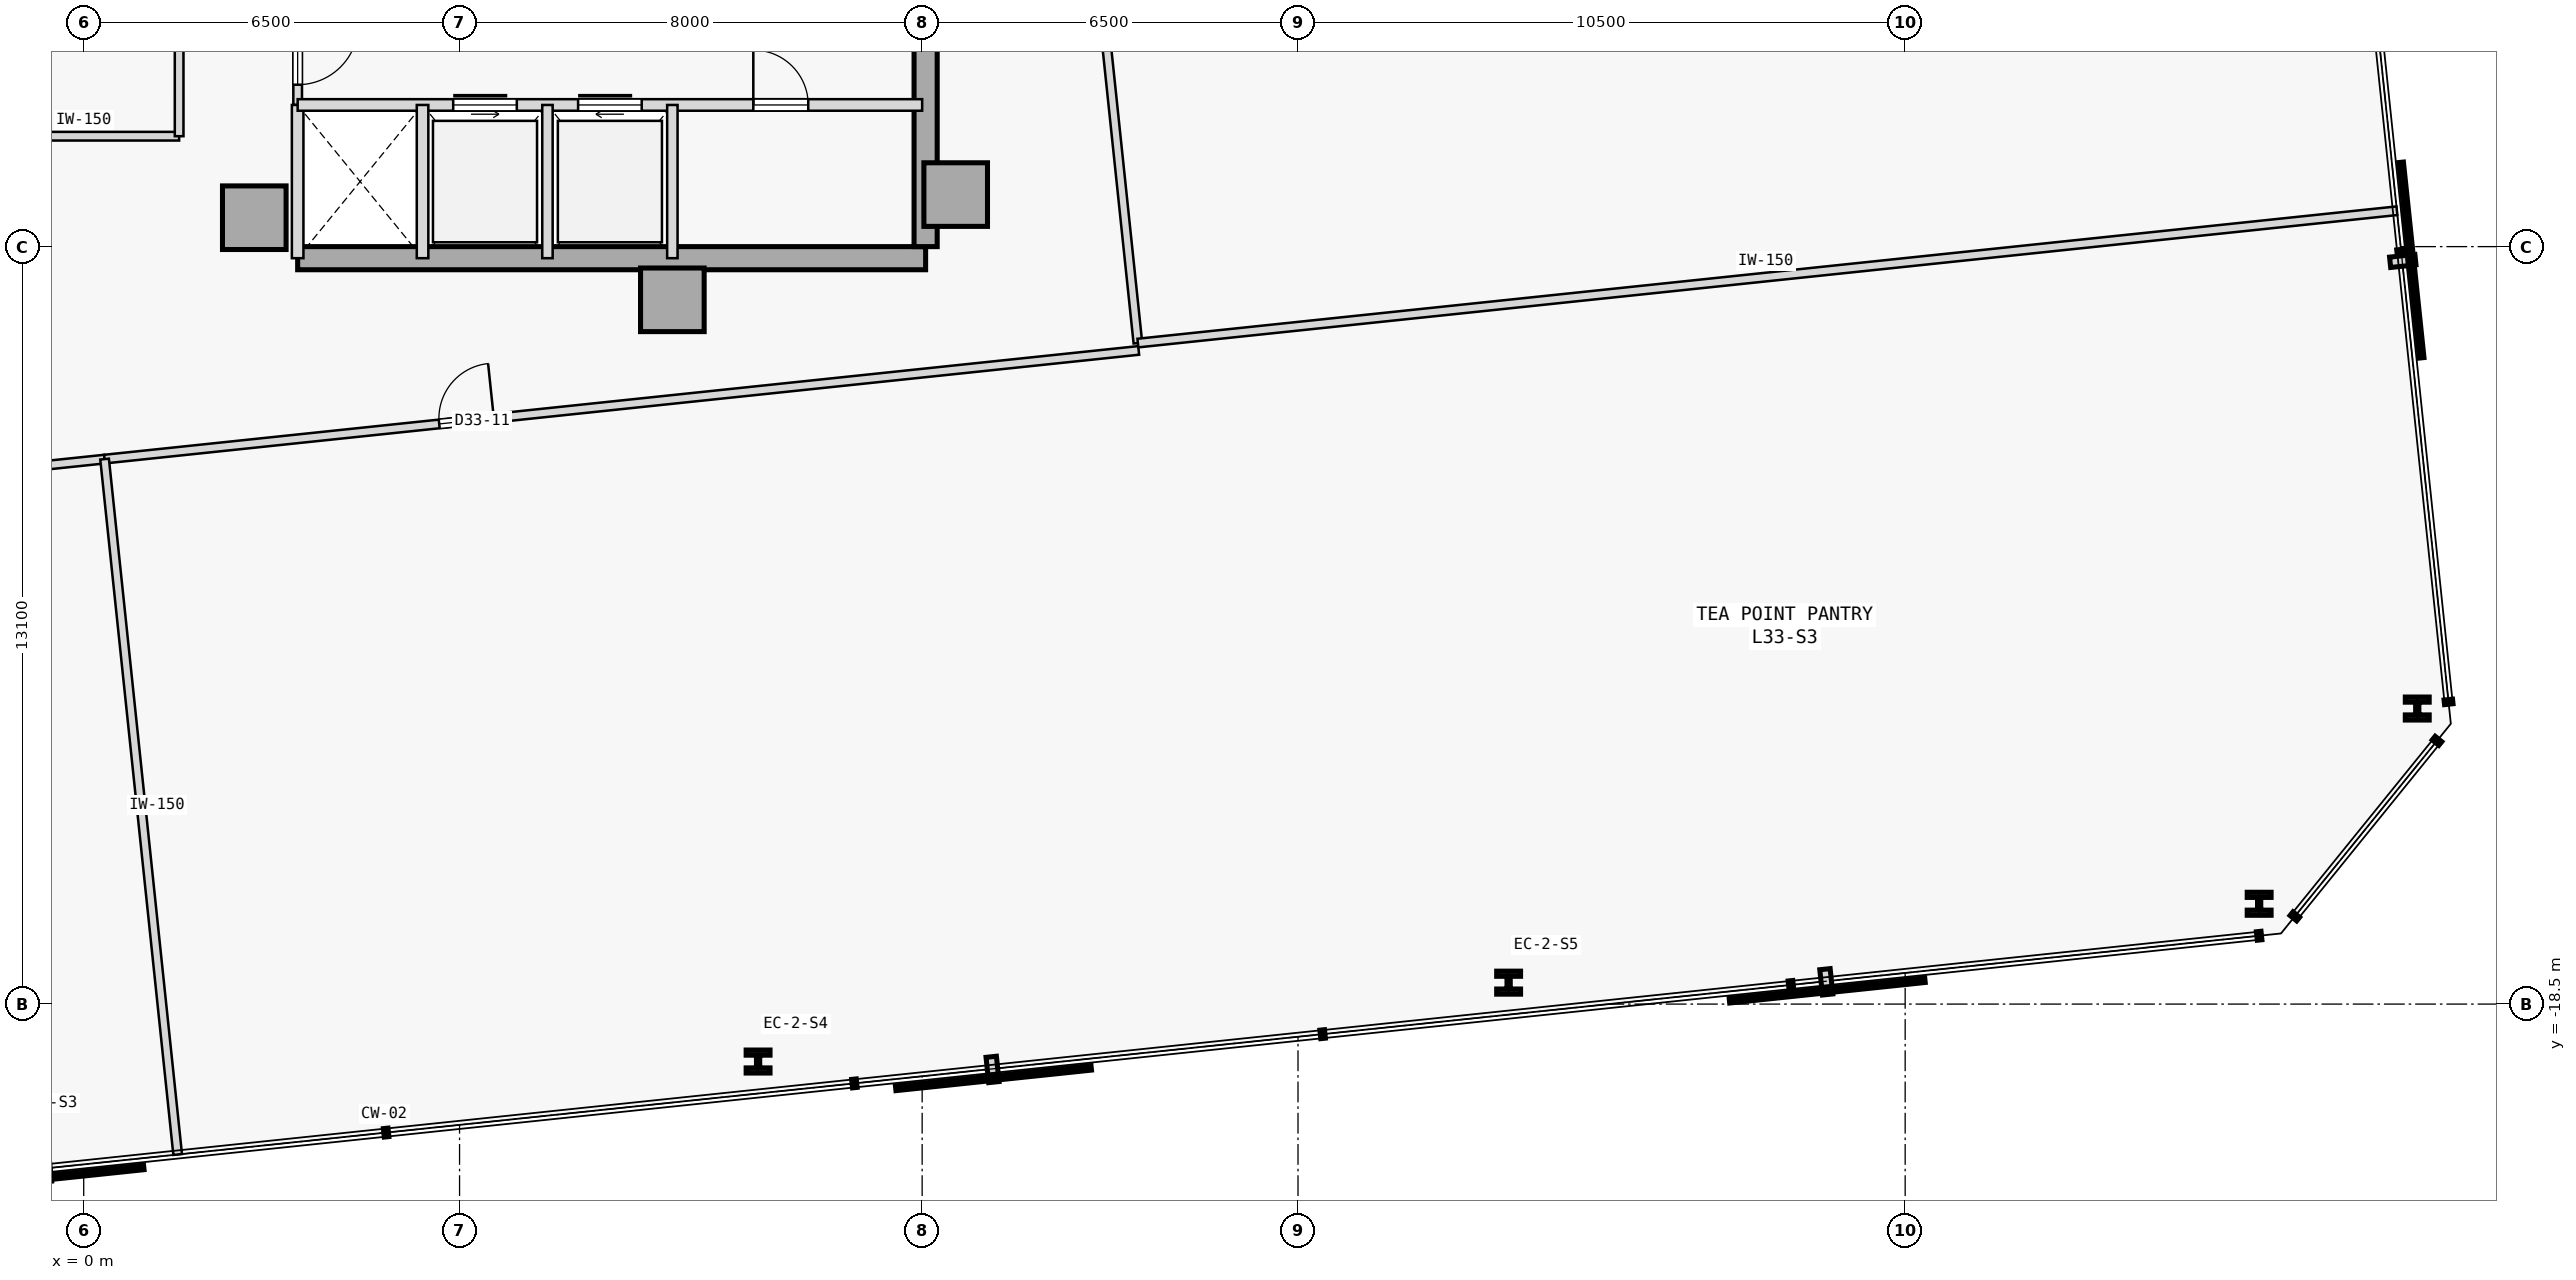
"""IFC4 building model, lengths in metres.
Left out: names, types, materials, properties, quantities, classifications, styles, units other than length and angle.
Written with IfcOpenShell. Run it as: python <this file> out.ifc"""

import sys

from ifc_helpers import new_model, si_unit, direction, frame, frame_2d, origin, origin_2d, place, context, subcontext, project, spatial, rectangle, i_section, extrude, element, fill, save


model = new_model("IFC4")
c1 = context("Model", 3, precision=1e-05, world=origin(), true_north=direction((0.0, 1.0)))
c2 = subcontext(c1, "Body", "Model", "MODEL_VIEW")
j1 = project(units=[si_unit("LENGTHUNIT", "METRE"), si_unit("PLANEANGLEUNIT", "RADIAN")], contexts=[c1])
p1 = place(None, origin())
s1 = spatial("IfcSite", under=j1, at=p1, CompositionType="ELEMENT")
p2 = place(p1, origin())
s2 = spatial("IfcBuilding", under=s1, at=p2, CompositionType="ELEMENT")
p3 = place(p2, frame((0.0, 0.0, 131.8)))
s3 = spatial("IfcBuildingStorey", under=s2, at=p3, CompositionType="ELEMENT", Elevation=131.8)
for number, where, z_axis, x_axis in (
    (1, (15.08, -4.5, 0.0), (0.0, 0.0, 1.0), (1.0, 0.0, 0.0)),
    (2, (10.18, -6.32, 0.0), (0.0, 0.0, 1.0), (1.0, 0.0, 0.0)),
    (3, (2.95, -4.9, 0.0), (0.0, 0.0, 1.0), (1.0, 0.0, 0.0)),
):
    element("IfcColumn", number, at=place(p3, frame(where, z_axis=z_axis, x_axis=x_axis)), inside=s3, PredefinedType="COLUMN", context=c2, shape_type="SweptSolid", body=[
        extrude(rectangle(XDim=1.1, YDim=1.1, at=origin_2d()), origin(), (0.0, 0.0, 1.0), 3.7),
    ])
p4 = place(p3, frame((3.7, -5.6, 0.0), z_axis=(0.0, 0.0, 1.0), x_axis=(1.0, 0.0, 0.0)))
e4 = element("IfcWall", 4, at=p4, inside=s3, PredefinedType="SHEAR", context=c2, shape_type="SweptSolid", body=[
    extrude(rectangle(XDim=10.86, YDim=0.4, at=frame_2d((5.43, 0.0))), origin(), (0.0, 0.0, 1.0), 3.475),
])
p5 = place(p3, frame((14.56, -5.4, 0.0), z_axis=(0.0, 0.0, 1.0), x_axis=(0.0, 1.0, 0.0)))
e5 = element("IfcWall", 5, at=p5, inside=s3, PredefinedType="SHEAR", context=c2, shape_type="SweptSolid", body=[
    extrude(rectangle(XDim=10.8, YDim=0.4, at=frame_2d((5.4, 0.0))), origin(), (0.0, 0.0, 1.0), 3.475),
])
for number, where, z_axis, x_axis in (
    (6, (11.663, -19.494, 0.0), (0.0, 0.0, 1.0), (1.0, 0.0, 0.0)),
    (7, (24.642, -18.129, 0.0), (0.0, 0.0, 1.0), (1.0, 0.0, 0.0)),
    (8, (37.622, -16.765, 0.0), (0.0, 0.0, 1.0), (1.0, 0.0, 0.0)),
    (9, (40.356, -13.389, 0.0), (0.0, 0.0, 1.0), (1.0, 0.0, 0.0)),
):
    element("IfcColumn", number, at=place(p3, frame(where, z_axis=z_axis, x_axis=x_axis)), inside=s3, PredefinedType="COLUMN", context=c2, shape_type="SweptSolid", body=[
        extrude(i_section(OverallWidth=0.413, OverallDepth=0.398, WebThickness=0.056, FlangeThickness=0.089, FilletRadius=0.015, at=origin_2d()), origin(), (0.0, 0.0, 1.0), 3.7),
    ])
p6 = place(p3, frame((3.7, -2.95, 0.0), z_axis=(0.0, 0.0, 1.0), x_axis=(0.0, 1.0, 0.0)))
e10 = element("IfcWall", 10, at=p6, inside=s3, PredefinedType="PARTITIONING", context=c2, shape_type="SweptSolid", body=[
    extrude(rectangle(XDim=1.8, YDim=0.15, at=frame_2d((0.9, 0.0))), origin(), (0.0, 0.0, 1.0), 3.475),
])
p7 = place(p6, frame((0.35, 0.0, 0.0)))
e11 = element("IfcOpeningElement", 11, at=p7, cuts=e10, PredefinedType="OPENING", context=c2, shape_type="SweptSolid", body=[
    extrude(rectangle(XDim=1.05, YDim=2.18, at=frame_2d((0.525, 1.09))), frame((0.0, 0.085, 0.0), z_axis=(0.0, -1.0, 0.0), x_axis=(1.0, 0.0, 0.0)), (0.0, 0.0, 1.0), 0.17),
])
p8 = place(p3, frame((3.7, -5.6, 0.0), z_axis=(0.0, 0.0, 1.0), x_axis=(0.0, 1.0, 0.0)))
e12 = element("IfcWall", 12, at=p8, inside=s3, PredefinedType="STANDARD", context=c2, shape_type="SweptSolid", body=[
    extrude(rectangle(XDim=2.65, YDim=0.2, at=frame_2d((1.325, 0.0))), origin(), (0.0, 0.0, 1.0), 3.475),
])
p9 = place(p3, frame((3.7, -2.95, 0.0), z_axis=(0.0, 0.0, 1.0), x_axis=(1.0, 0.0, 0.0)))
e13 = element("IfcWall", 13, at=p9, inside=s3, PredefinedType="STANDARD", context=c2, shape_type="SweptSolid", body=[
    extrude(rectangle(XDim=10.8, YDim=0.2, at=frame_2d((5.4, 0.0))), origin(), (0.0, 0.0, 1.0), 3.475),
])
p10 = place(p9, frame((2.69, 0.0, 0.0)))
e14 = element("IfcOpeningElement", 14, at=p10, cuts=e13, PredefinedType="OPENING", context=c2, shape_type="SweptSolid", body=[
    extrude(rectangle(XDim=1.1, YDim=2.15, at=frame_2d((0.55, 1.075))), frame((0.0, 0.11, 0.0), z_axis=(0.0, -1.0, 0.0), x_axis=(1.0, 0.0, 0.0)), (0.0, 0.0, 1.0), 0.22),
])
p11 = place(p9, frame((4.85, 0.0, 0.0)))
e15 = element("IfcOpeningElement", 15, at=p11, cuts=e13, PredefinedType="OPENING", context=c2, shape_type="SweptSolid", body=[
    extrude(rectangle(XDim=1.1, YDim=2.15, at=frame_2d((0.55, 1.075))), frame((0.0, 0.11, 0.0), z_axis=(0.0, -1.0, 0.0), x_axis=(1.0, 0.0, 0.0)), (0.0, 0.0, 1.0), 0.22),
])
p12 = place(p9, frame((7.88, 0.0, 0.0)))
e16 = element("IfcOpeningElement", 16, at=p12, cuts=e13, PredefinedType="OPENING", context=c2, shape_type="SweptSolid", body=[
    extrude(rectangle(XDim=0.95, YDim=2.15, at=frame_2d((0.475, 1.075))), frame((0.0, 0.11, 0.0), z_axis=(0.0, -1.0, 0.0), x_axis=(1.0, 0.0, 0.0)), (0.0, 0.0, 1.0), 0.22),
])
p13 = place(p3, frame((5.86, -5.6, 0.0), z_axis=(0.0, 0.0, 1.0), x_axis=(0.0, 1.0, 0.0)))
e17 = element("IfcWall", 17, at=p13, inside=s3, PredefinedType="STANDARD", context=c2, shape_type="SweptSolid", body=[
    extrude(rectangle(XDim=2.65, YDim=0.2, at=frame_2d((1.325, 0.0))), origin(), (0.0, 0.0, 1.0), 3.475),
])
for number, where, z_axis, x_axis in (
    (18, (10.18, -5.6, 0.0), (0.0, 0.0, 1.0), (0.0, 1.0, 0.0)),
    (19, (8.02, -5.6, 0.0), (0.0, 0.0, 1.0), (0.0, 1.0, 0.0)),
):
    element("IfcWall", number, at=place(p3, frame(where, z_axis=z_axis, x_axis=x_axis)), inside=s3, PredefinedType="STANDARD", context=c2, shape_type="SweptSolid", body=[
        extrude(rectangle(XDim=2.65, YDim=0.18, at=frame_2d((1.325, 0.0))), origin(), (0.0, 0.0, 1.0), 3.475),
    ])
p14 = place(p3, frame((-1.65, -3.49, 0.0), z_axis=(0.0, 0.0, 1.0), x_axis=(1.0, 0.0, 0.0)))
e20 = element("IfcWall", 20, at=p14, inside=s3, PredefinedType="PARTITIONING", context=c2, shape_type="SweptSolid", body=[
    extrude(rectangle(XDim=3.3, YDim=0.15, at=frame_2d((1.65, 0.0))), origin(), (0.0, 0.0, 1.0), 3.475),
])
p15 = place(p3, frame((1.65, -3.49, 0.0), z_axis=(0.0, 0.0, 1.0), x_axis=(-6.9952083e-05, 0.999999997553, 0.0)))
e21 = element("IfcWall", 21, at=p15, inside=s3, PredefinedType="PARTITIONING", context=c2, shape_type="SweptSolid", body=[
    extrude(rectangle(XDim=6.98, YDim=0.15, at=frame_2d((3.49, 0.0))), origin(), (0.0, 0.0, 1.0), 3.475),
])
p16 = place(p3, frame((-16.14, -10.809, 0.0), z_axis=(0.0, 0.0, 1.0), x_axis=(0.994521566569, 0.104531591539, 0.0)))
e22 = element("IfcWall", 22, at=p16, inside=s3, PredefinedType="PARTITIONING", context=c2, shape_type="SweptSolid", body=[
    extrude(rectangle(XDim=16.592, YDim=0.15, at=frame_2d((8.296, 0.0))), origin(), (0.0, 0.0, 1.0), 3.475),
])
p17 = place(p16, frame((7.821, 0.0, 0.0)))
e23 = element("IfcOpeningElement", 23, at=p17, cuts=e22, PredefinedType="OPENING", context=c2, shape_type="SweptSolid", body=[
    extrude(rectangle(XDim=0.95, YDim=2.15, at=frame_2d((0.475, 1.075))), frame((0.0, 0.085, 0.0), z_axis=(0.0, -1.0, 0.0), x_axis=(1.0, 0.0, 0.0)), (0.0, 0.0, 1.0), 0.17),
])
p18 = place(p3, frame((0.361, -9.075, 0.0), z_axis=(0.0, 0.0, 1.0), x_axis=(0.994523293042, 0.104515164432, 0.0)))
e24 = element("IfcWall", 24, at=p18, inside=s3, PredefinedType="PARTITIONING", context=c2, shape_type="SweptSolid", body=[
    extrude(rectangle(XDim=17.982, YDim=0.15, at=frame_2d((8.991, 0.0))), origin(), (0.0, 0.0, 1.0), 3.475),
])
p19 = place(p18, frame((5.819, 0.0, 0.0)))
e25 = element("IfcOpeningElement", 25, at=p19, cuts=e24, PredefinedType="OPENING", context=c2, shape_type="SweptSolid", body=[
    extrude(rectangle(XDim=0.95, YDim=2.15, at=frame_2d((0.475, 1.075))), frame((0.0, 0.085, 0.0), z_axis=(0.0, -1.0, 0.0), x_axis=(1.0, 0.0, 0.0)), (0.0, 0.0, 1.0), 0.17),
])
p20 = place(p3, frame((18.231, -7.068, 0.0), z_axis=(0.0, 0.0, 1.0), x_axis=(-0.104529034836, 0.994521835294, 0.0)))
e26 = element("IfcWall", 26, at=p20, inside=s3, PredefinedType="PARTITIONING", context=c2, shape_type="SweptSolid", body=[
    extrude(rectangle(XDim=17.87, YDim=0.15, at=frame_2d((8.935, 0.0))), origin(), (0.0, 0.0, 1.0), 3.475),
])
p21 = place(p20, frame((8.46, 0.0, 0.0)))
e27 = element("IfcOpeningElement", 27, at=p21, cuts=e26, PredefinedType="OPENING", context=c2, shape_type="SweptSolid", body=[
    extrude(rectangle(XDim=0.95, YDim=2.15, at=frame_2d((0.475, 1.075))), frame((0.0, 0.085, 0.0), z_axis=(0.0, -1.0, 0.0), x_axis=(1.0, 0.0, 0.0)), (0.0, 0.0, 1.0), 0.17),
])
p22 = place(p3, frame((1.625, -21.102, 0.0), z_axis=(0.0, 0.0, 1.0), x_axis=(-0.104515587229, 0.99452324861, 0.0)))
e28 = element("IfcWall", 28, at=p22, inside=s3, PredefinedType="PARTITIONING", context=c2, shape_type="SweptSolid", body=[
    extrude(rectangle(XDim=12.093, YDim=0.15, at=frame_2d((6.046, 0.0))), origin(), (0.0, 0.0, 1.0), 3.475),
])
p23 = place(p3, frame((18.231, -7.068, 0.0), z_axis=(0.0, 0.0, 1.0), x_axis=(0.994521328491, 0.104533856601, 0.0)))
e29 = element("IfcWall", 29, at=p23, inside=s3, PredefinedType="PARTITIONING", context=c2, shape_type="SweptSolid", body=[
    extrude(rectangle(XDim=21.893, YDim=0.15, at=frame_2d((10.947, 0.0))), origin(), (0.0, 0.0, 1.0), 3.475),
])
p24 = place(p7, frame((1.05, 0.0, 0.0), z_axis=(0.0, 0.0, 1.0), x_axis=(-1.0, 0.0, 0.0)))
e30 = element("IfcDoor", 30, at=p24, inside=s3, OperationType="SINGLE_SWING_RIGHT", PredefinedType="DOOR", context=c2, shape_type="SweptSolid", body=[
    extrude(rectangle(XDim=1.05, YDim=2.18, at=frame_2d((0.525, 1.09))), frame((0.0, 0.025, 0.0), z_axis=(0.0, -1.0, 0.0), x_axis=(1.0, 0.0, 0.0)), (0.0, 0.0, 1.0), 0.05),
])
fill(e11, e30)
p25 = place(p10, origin())
e31 = element("IfcDoor", 31, at=p25, inside=s3, OperationType="SLIDING_TO_LEFT", PredefinedType="DOOR", context=c2, shape_type="SweptSolid", body=[
    extrude(rectangle(XDim=1.1, YDim=2.15, at=frame_2d((0.55, 1.075))), frame((0.0, 0.025, 0.0), z_axis=(0.0, -1.0, 0.0), x_axis=(1.0, 0.0, 0.0)), (0.0, 0.0, 1.0), 0.05),
])
fill(e14, e31)
p26 = place(p11, origin())
e32 = element("IfcDoor", 32, at=p26, inside=s3, OperationType="SLIDING_TO_RIGHT", PredefinedType="DOOR", context=c2, shape_type="SweptSolid", body=[
    extrude(rectangle(XDim=1.1, YDim=2.15, at=frame_2d((0.55, 1.075))), frame((0.0, 0.025, 0.0), z_axis=(0.0, -1.0, 0.0), x_axis=(1.0, 0.0, 0.0)), (0.0, 0.0, 1.0), 0.05),
])
fill(e15, e32)
p27 = place(p12, origin())
e33 = element("IfcDoor", 33, at=p27, inside=s3, OperationType="SINGLE_SWING_LEFT", PredefinedType="DOOR", context=c2, shape_type="SweptSolid", body=[
    extrude(rectangle(XDim=0.95, YDim=2.15, at=frame_2d((0.475, 1.075))), frame((0.0, 0.025, 0.0), z_axis=(0.0, -1.0, 0.0), x_axis=(1.0, 0.0, 0.0)), (0.0, 0.0, 1.0), 0.05),
])
fill(e16, e33)
p28 = place(p19, origin())
e34 = element("IfcDoor", 34, at=p28, inside=s3, OperationType="SINGLE_SWING_RIGHT", PredefinedType="DOOR", context=c2, shape_type="SweptSolid", body=[
    extrude(rectangle(XDim=0.95, YDim=2.15, at=frame_2d((0.475, 1.075))), frame((0.0, 0.025, 0.0), z_axis=(0.0, -1.0, 0.0), x_axis=(1.0, 0.0, 0.0)), (0.0, 0.0, 1.0), 0.05),
])
fill(e25, e34)
save(model, sys.argv[1])
